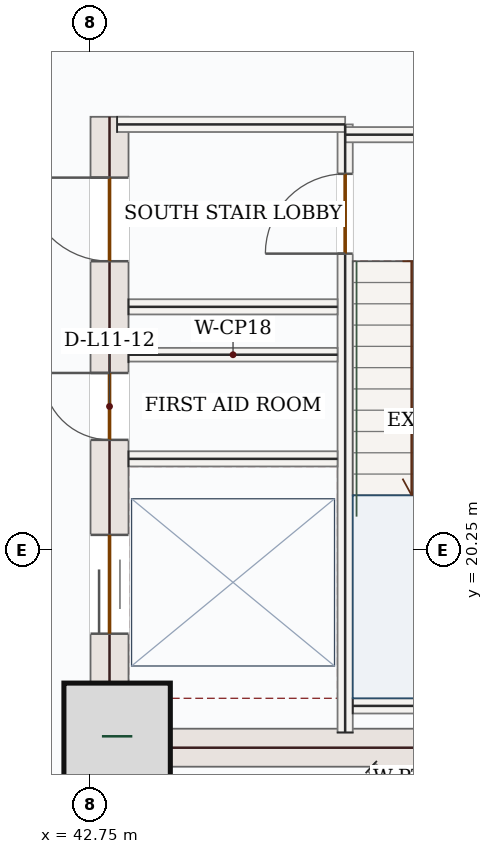
"""IFC4 building model, lengths in metres.
Left out: names, types, materials, properties, quantities, classifications, styles, units other than length and angle.
Written with IfcOpenShell. Run it as: python <this file> out.ifc"""

import sys

from ifc_helpers import new_model, si_unit, direction, frame, frame_2d, origin, origin_2d, place, context, subcontext, project, spatial, rectangle, extrude, source, transform, mapped, element, fill, save


model = new_model("IFC4")
c1 = context("Model", 3, precision=1e-05, world=origin(), true_north=direction((0.0, 1.0)))
c2 = subcontext(c1, "Body", "Model", "MODEL_VIEW")
j1 = project(units=[si_unit("LENGTHUNIT", "METRE"), si_unit("PLANEANGLEUNIT", "RADIAN")], contexts=[c1])
p1 = place(None, origin())
s1 = spatial("IfcSite", under=j1, at=p1, CompositionType="ELEMENT")
p2 = place(p1, origin())
s2 = spatial("IfcBuilding", under=s1, at=p2, CompositionType="ELEMENT")
p3 = place(p2, frame((0.0, 0.0, 54.3)))
s3 = spatial("IfcBuildingStorey", under=s2, at=p3, CompositionType="ELEMENT", Elevation=54.3)
p4 = place(p3, frame((43.0, 17.4, 0.0), z_axis=(0.0, 0.0, 1.0), x_axis=(0.0, 1.0, 0.0)))
e1 = element("IfcWall", 1, at=p4, inside=s3, PredefinedType="SHEAR", context=c2, shape_type="SweptSolid", body=[
    extrude(rectangle(XDim=8.55, YDim=0.5, at=frame_2d((4.275, 0.0))), origin(), (0.0, 0.0, 1.0), 3.95),
])
p5 = place(p4, frame((6.65, 0.0, 0.0)))
e2 = element("IfcOpeningElement", 2, at=p5, cuts=e1, PredefinedType="OPENING", context=c2, shape_type="SweptSolid", body=[
    extrude(rectangle(XDim=1.1, YDim=2.2, at=frame_2d((0.55, 1.1))), frame((0.0, 0.26, 0.0), z_axis=(0.0, -1.0, 0.0), x_axis=(1.0, 0.0, 0.0)), (0.0, 0.0, 1.0), 0.52),
])
p6 = place(p4, frame((1.75, 0.0, 0.0)))
e3 = element("IfcOpeningElement", 3, at=p6, cuts=e1, PredefinedType="OPENING", context=c2, shape_type="SweptSolid", body=[
    extrude(rectangle(XDim=1.3, YDim=2.2, at=frame_2d((0.65, 1.1))), frame((0.0, 0.26, 0.0), z_axis=(0.0, -1.0, 0.0), x_axis=(1.0, 0.0, 0.0)), (0.0, 0.0, 1.0), 0.52),
])
p7 = place(p4, frame((4.3, 0.0, 0.0)))
e4 = element("IfcOpeningElement", 4, at=p7, cuts=e1, PredefinedType="OPENING", context=c2, shape_type="SweptSolid", body=[
    extrude(rectangle(XDim=0.88, YDim=2.1, at=frame_2d((0.44, 1.05))), frame((0.0, 0.26, 0.0), z_axis=(0.0, -1.0, 0.0), x_axis=(1.0, 0.0, 0.0)), (0.0, 0.0, 1.0), 0.52),
])
m1 = source(origin(), c2, "Body", "SweptSolid", [
    extrude(rectangle(XDim=7.0, YDim=0.5, at=frame_2d((3.5, 0.0))), origin(), (0.0, 0.0, 1.0), 3.95),
])
p8 = place(p3, frame((43.25, 17.65, 0.0), z_axis=(0.0, 0.0, 1.0), x_axis=(1.0, 0.0, 0.0)))
e5 = element("IfcWall", 5, at=p8, inside=s3, PredefinedType="SHEAR", context=c2, shape_type="MappedRepresentation", body=[
    mapped(m1, transform((0.0, 0.0, 0.0), x_axis=(1.0, 0.0, 0.0), y_axis=(0.0, 1.0, 0.0), z_axis=(0.0, 0.0, 1.0), scale=1.0)),
])
m2 = source(origin(), c2, "Body", "SweptSolid", [
    extrude(rectangle(XDim=1.4, YDim=1.4, at=origin_2d()), origin(), (0.0, 0.0, 1.0), 4.2),
])
p9 = place(p3, frame((43.1, 17.8, 0.0), z_axis=(0.0, 0.0, 1.0), x_axis=(1.0, 0.0, 0.0)))
e6 = element("IfcColumn", 6, at=p9, inside=s3, PredefinedType="COLUMN", context=c2, shape_type="MappedRepresentation", body=[
    mapped(m2, transform((0.0, 0.0, 0.0), x_axis=(1.0, 0.0, 0.0), y_axis=(0.0, 1.0, 0.0), z_axis=(0.0, 0.0, 1.0), scale=1.0)),
])
p10 = place(p3, frame((46.1, 17.85, 0.0), z_axis=(0.0, 0.0, 1.0), x_axis=(0.0, 1.0, 0.0)))
e7 = element("IfcWall", 7, at=p10, inside=s3, PredefinedType="SOLIDWALL", context=c2, shape_type="SweptSolid", body=[
    extrude(rectangle(XDim=8.0, YDim=0.2, at=frame_2d((4.0, 0.0))), origin(), (0.0, 0.0, 1.0), 3.95),
])
p11 = place(p10, frame((6.3, 0.0, 0.0)))
e8 = element("IfcOpeningElement", 8, at=p11, cuts=e7, PredefinedType="OPENING", context=c2, shape_type="SweptSolid", body=[
    extrude(rectangle(XDim=1.05, YDim=2.15, at=frame_2d((0.525, 1.075))), frame((0.0, 0.11, 0.0), z_axis=(0.0, -1.0, 0.0), x_axis=(1.0, 0.0, 0.0)), (0.0, 0.0, 1.0), 0.22),
])
m3 = source(origin(), c2, "Body", "SweptSolid", [
    extrude(rectangle(XDim=3.0, YDim=0.2, at=frame_2d((1.5, 0.0))), origin(), (0.0, 0.0, 1.0), 3.95),
])
p12 = place(p3, frame((43.1, 25.85, 0.0), z_axis=(0.0, 0.0, 1.0), x_axis=(1.0, 0.0, 0.0)))
e9 = element("IfcWall", 9, at=p12, inside=s3, PredefinedType="SOLIDWALL", context=c2, shape_type="MappedRepresentation", body=[
    mapped(m3, transform((0.0, 0.0, 0.0), x_axis=(1.0, 0.0, 0.0), y_axis=(0.0, 1.0, 0.0), z_axis=(0.0, 0.0, 1.0), scale=1.0)),
])
m4 = source(origin(), c2, "Body", "SweptSolid", [
    extrude(rectangle(XDim=4.25, YDim=0.2, at=frame_2d((2.125, 0.0))), origin(), (0.0, 0.0, 1.0), 3.95),
])
p13 = place(p3, frame((46.1, 25.715, 0.0), z_axis=(0.0, 0.0, 1.0), x_axis=(1.0, 0.0, 0.0)))
e10 = element("IfcWall", 10, at=p13, inside=s3, PredefinedType="SOLIDWALL", context=c2, shape_type="MappedRepresentation", body=[
    mapped(m4, transform((0.0, 0.0, 0.0), x_axis=(1.0, 0.0, 0.0), y_axis=(0.0, 1.0, 0.0), z_axis=(0.0, 0.0, 1.0), scale=1.0)),
])
m5 = source(origin(), c2, "Body", "SweptSolid", [
    extrude(rectangle(XDim=3.25, YDim=0.2, at=frame_2d((1.625, 0.0))), origin(), (0.0, 0.0, 1.0), 3.95),
])
p14 = place(p3, frame((46.2, 18.2, 0.0), z_axis=(0.0, 0.0, 1.0), x_axis=(1.0, 0.0, 0.0)))
e11 = element("IfcWall", 11, at=p14, inside=s3, PredefinedType="SOLIDWALL", context=c2, shape_type="MappedRepresentation", body=[
    mapped(m5, transform((0.0, 0.0, 0.0), x_axis=(1.0, 0.0, 0.0), y_axis=(0.0, 1.0, 0.0), z_axis=(0.0, 0.0, 1.0), scale=1.0)),
])
m6 = source(origin(), c2, "Body", "SweptSolid", [
    extrude(rectangle(XDim=2.75, YDim=0.2, at=frame_2d((1.375, 0.0))), origin(), (0.0, 0.0, 1.0), 3.95),
])
for number, where, z_axis, x_axis in (
    (12, (43.25, 23.45, 0.0), (0.0, 0.0, 1.0), (1.0, 0.0, 0.0)),
    (13, (43.25, 21.45, 0.0), (0.0, 0.0, 1.0), (1.0, 0.0, 0.0)),
):
    element("IfcWall", number, at=place(p3, frame(where, z_axis=z_axis, x_axis=x_axis)), inside=s3, PredefinedType="SOLIDWALL", context=c2, shape_type="MappedRepresentation", body=[
        mapped(m6, transform((0.0, 0.0, 0.0), x_axis=(1.0, 0.0, 0.0), y_axis=(0.0, 1.0, 0.0), z_axis=(0.0, 0.0, 1.0), scale=1.0)),
    ])
m7 = source(origin(), c2, "Body", "SweptSolid", [
    extrude(rectangle(XDim=2.75, YDim=0.18, at=frame_2d((1.375, 0.0))), origin(), (0.0, 0.0, 1.0), 3.95),
])
p15 = place(p3, frame((43.25, 22.82, 0.0), z_axis=(0.0, 0.0, 1.0), x_axis=(1.0, 0.0, 0.0)))
e14 = element("IfcWall", 14, at=p15, inside=s3, PredefinedType="PARTITIONING", context=c2, shape_type="MappedRepresentation", body=[
    mapped(m7, transform((0.0, 0.0, 0.0), x_axis=(1.0, 0.0, 0.0), y_axis=(0.0, 1.0, 0.0), z_axis=(0.0, 0.0, 1.0), scale=1.0)),
])
m8 = source(origin(), c2, "Body", "SweptSolid", [
    extrude(rectangle(XDim=1.417, YDim=0.14, at=frame_2d((0.708, 0.0))), origin(), (0.0, 0.0, 1.0), 3.95),
])
p16 = place(p3, frame((46.443, 17.395, 0.0), z_axis=(0.0, 0.0, 1.0), x_axis=(0.737776192982, -0.675045397784, 0.0)))
e15 = element("IfcWall", 15, at=p16, inside=s3, PredefinedType="PARTITIONING", context=c2, shape_type="MappedRepresentation", body=[
    mapped(m8, transform((0.0, 0.0, 0.0), x_axis=(1.0, 0.0, 0.0), y_axis=(0.0, 1.0, 0.0), z_axis=(0.0, 0.0, 1.0), scale=1.0)),
])
m9 = source(origin(), c2, "Body", "SweptSolid", [
    extrude(rectangle(XDim=1.05, YDim=2.15, at=frame_2d((0.525, 1.075))), frame((0.0, 0.025, 0.0), z_axis=(0.0, -1.0, 0.0), x_axis=(1.0, 0.0, 0.0)), (0.0, 0.0, 1.0), 0.05),
])
p17 = place(p11, origin())
e16 = element("IfcDoor", 16, at=p17, inside=s3, OperationType="SINGLE_SWING_LEFT", PredefinedType="DOOR", context=c2, shape_type="MappedRepresentation", body=[
    mapped(m9, transform((0.0, 0.0, 0.0), x_axis=(1.0, 0.0, 0.0), y_axis=(0.0, 1.0, 0.0), z_axis=(0.0, 0.0, 1.0), scale=1.0)),
])
fill(e8, e16)
m10 = source(origin(), c2, "Body", "SweptSolid", [
    extrude(rectangle(XDim=1.1, YDim=2.2, at=frame_2d((0.55, 1.1))), frame((0.0, 0.025, 0.0), z_axis=(0.0, -1.0, 0.0), x_axis=(1.0, 0.0, 0.0)), (0.0, 0.0, 1.0), 0.05),
])
p18 = place(p5, origin())
e17 = element("IfcDoor", 17, at=p18, inside=s3, OperationType="SINGLE_SWING_RIGHT", PredefinedType="DOOR", context=c2, shape_type="MappedRepresentation", body=[
    mapped(m10, transform((0.0, 0.0, 0.0), x_axis=(1.0, 0.0, 0.0), y_axis=(0.0, 1.0, 0.0), z_axis=(0.0, 0.0, 1.0), scale=1.0)),
])
fill(e2, e17)
m11 = source(origin(), c2, "Body", "SweptSolid", [
    extrude(rectangle(XDim=1.3, YDim=2.2, at=frame_2d((0.65, 1.1))), frame((0.0, 0.025, 0.0), z_axis=(0.0, -1.0, 0.0), x_axis=(1.0, 0.0, 0.0)), (0.0, 0.0, 1.0), 0.05),
])
p19 = place(p6, origin())
e18 = element("IfcDoor", 18, at=p19, inside=s3, OperationType="DOUBLE_DOOR_SLIDING", PredefinedType="DOOR", context=c2, shape_type="MappedRepresentation", body=[
    mapped(m11, transform((0.0, 0.0, 0.0), x_axis=(1.0, 0.0, 0.0), y_axis=(0.0, 1.0, 0.0), z_axis=(0.0, 0.0, 1.0), scale=1.0)),
])
fill(e3, e18)
m12 = source(origin(), c2, "Body", "SweptSolid", [
    extrude(rectangle(XDim=0.88, YDim=2.1, at=frame_2d((0.44, 1.05))), frame((0.0, 0.025, 0.0), z_axis=(0.0, -1.0, 0.0), x_axis=(1.0, 0.0, 0.0)), (0.0, 0.0, 1.0), 0.05),
])
p20 = place(p7, origin())
e19 = element("IfcDoor", 19, at=p20, inside=s3, OperationType="SINGLE_SWING_RIGHT", PredefinedType="DOOR", context=c2, shape_type="MappedRepresentation", body=[
    mapped(m12, transform((0.0, 0.0, 0.0), x_axis=(1.0, 0.0, 0.0), y_axis=(0.0, 1.0, 0.0), z_axis=(0.0, 0.0, 1.0), scale=1.0)),
])
fill(e4, e19)
save(model, sys.argv[1])
